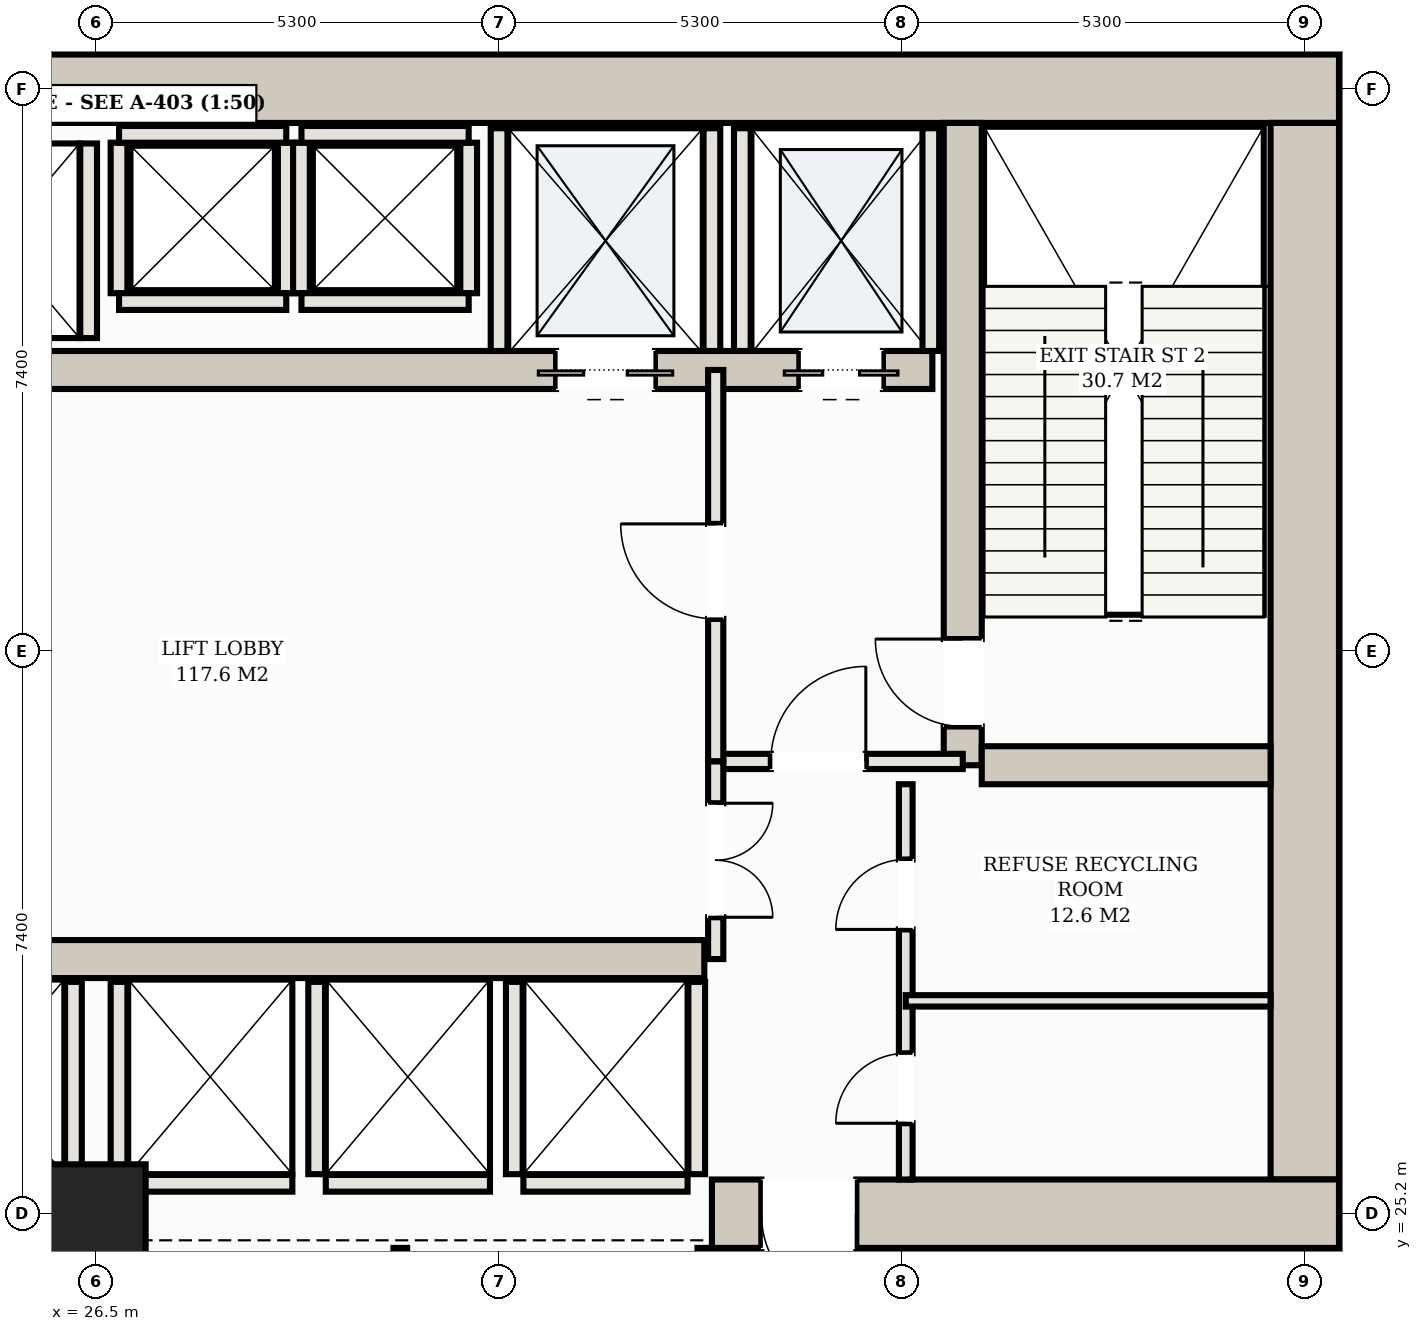
"""IFC4 building model, lengths in metres.
Left out: names, types, materials, properties, quantities, classifications, styles, units other than length and angle.
Written with IfcOpenShell. Run it as: python <this file> out.ifc"""

import sys

from ifc_helpers import new_model, si_unit, direction, frame, frame_2d, origin, origin_2d, place, context, subcontext, project, spatial, rectangle, hollow_rectangle, extrude, element, fill, save


model = new_model("IFC4")
c1 = context("Model", 3, precision=1e-05, world=origin(), true_north=direction((0.0, 1.0)))
c2 = subcontext(c1, "Body", "Model", "MODEL_VIEW")
j1 = project(units=[si_unit("LENGTHUNIT", "METRE"), si_unit("PLANEANGLEUNIT", "RADIAN")], contexts=[c1])
p1 = place(None, origin())
s1 = spatial("IfcSite", under=j1, at=p1, CompositionType="ELEMENT")
p2 = place(p1, origin())
s2 = spatial("IfcBuilding", under=s1, at=p2, CompositionType="ELEMENT")
p3 = place(p2, frame((0.0, 0.0, 19.0)))
s3 = spatial("IfcBuildingStorey", under=s2, at=p3, CompositionType="ELEMENT", Elevation=19.0)
p4 = place(p3, frame((10.15, 40.0, 0.0), z_axis=(0.0, 0.0, 1.0), x_axis=(1.0, 0.0, 0.0)))
e1 = element("IfcWall", 1, at=p4, inside=s3, PredefinedType="SHEAR", context=c2, shape_type="SweptSolid", body=[
    extrude(rectangle(XDim=32.7, YDim=0.9, at=frame_2d((16.35, 0.0))), origin(), (0.0, 0.0, 1.0), 4.86),
])
p5 = place(p3, frame((42.4, 25.65, 0.0), z_axis=(0.0, 0.0, 1.0), x_axis=(0.0, 1.0, 0.0)))
e2 = element("IfcWall", 2, at=p5, inside=s3, PredefinedType="SHEAR", context=c2, shape_type="SweptSolid", body=[
    extrude(rectangle(XDim=13.9, YDim=0.9, at=frame_2d((6.95, 0.0))), origin(), (0.0, 0.0, 1.0), 4.86),
])
p6 = place(p3, frame((34.6, 25.2, 0.0), z_axis=(0.0, 0.0, 1.0), x_axis=(1.0, 0.0, 0.0)))
e3 = element("IfcWall", 3, at=p6, inside=s3, PredefinedType="SHEAR", context=c2, shape_type="SweptSolid", body=[
    extrude(rectangle(XDim=8.25, YDim=0.9, at=frame_2d((4.125, 0.0))), origin(), (0.0, 0.0, 1.0), 4.86),
])
p7 = place(p6, frame((0.65, 0.0, 0.0)))
e4 = element("IfcOpeningElement", 4, at=p7, cuts=e3, PredefinedType="OPENING", context=c2, shape_type="SweptSolid", body=[
    extrude(rectangle(XDim=1.25, YDim=2.2, at=frame_2d((0.625, 1.1))), frame((0.0, 0.46, 0.0), z_axis=(0.0, -1.0, 0.0), x_axis=(1.0, 0.0, 0.0)), (0.0, 0.0, 1.0), 0.92),
])
p8 = place(p3, frame((37.9, 31.1, 0.0), z_axis=(0.0, 0.0, 1.0), x_axis=(0.0, 1.0, 0.0)))
e5 = element("IfcWall", 5, at=p8, inside=s3, PredefinedType="SHEAR", context=c2, shape_type="SweptSolid", body=[
    extrude(rectangle(XDim=8.45, YDim=0.5, at=frame_2d((4.225, 0.0))), origin(), (0.0, 0.0, 1.0), 4.86),
])
p9 = place(p8, frame((0.51, 0.0, 0.0)))
e6 = element("IfcOpeningElement", 6, at=p9, cuts=e5, PredefinedType="OPENING", context=c2, shape_type="SweptSolid", body=[
    extrude(rectangle(XDim=1.15, YDim=2.2, at=frame_2d((0.575, 1.1))), frame((0.0, 0.26, 0.0), z_axis=(0.0, -1.0, 0.0), x_axis=(1.0, 0.0, 0.0)), (0.0, 0.0, 1.0), 0.52),
])
p10 = place(p3, frame((38.15, 31.1, 0.0), z_axis=(0.0, 0.0, 1.0), x_axis=(1.0, 0.0, 0.0)))
e7 = element("IfcWall", 7, at=p10, inside=s3, PredefinedType="SHEAR", context=c2, shape_type="SweptSolid", body=[
    extrude(rectangle(XDim=3.8, YDim=0.5, at=frame_2d((1.9, 0.0))), origin(), (0.0, 0.0, 1.0), 4.86),
])
p11 = place(p3, frame((15.5, 36.3, 0.0), z_axis=(0.0, 0.0, 1.0), x_axis=(1.0, 0.0, 0.0)))
e8 = element("IfcWall", 8, at=p11, inside=s3, PredefinedType="SHEAR", context=c2, shape_type="SweptSolid", body=[
    extrude(rectangle(XDim=22.0, YDim=0.5, at=frame_2d((11.0, 0.0))), origin(), (0.0, 0.0, 1.0), 4.86),
])
p12 = place(p11, frame((0.65, 0.0, 0.0)))
e9 = element("IfcOpeningElement", 9, at=p12, cuts=e8, PredefinedType="OPENING", context=c2, shape_type="SweptSolid", body=[
    extrude(rectangle(XDim=1.1, YDim=2.15, at=frame_2d((0.55, 1.075))), frame((0.0, 0.26, 0.0), z_axis=(0.0, -1.0, 0.0), x_axis=(1.0, 0.0, 0.0)), (0.0, 0.0, 1.0), 0.52),
])
p13 = place(p11, frame((20.25, 0.0, 0.0)))
e10 = element("IfcOpeningElement", 10, at=p13, cuts=e8, PredefinedType="OPENING", context=c2, shape_type="SweptSolid", body=[
    extrude(rectangle(XDim=1.1, YDim=2.15, at=frame_2d((0.55, 1.075))), frame((0.0, 0.26, 0.0), z_axis=(0.0, -1.0, 0.0), x_axis=(1.0, 0.0, 0.0)), (0.0, 0.0, 1.0), 0.52),
])
p14 = place(p11, frame((17.05, 0.0, 0.0)))
e11 = element("IfcOpeningElement", 11, at=p14, cuts=e8, PredefinedType="OPENING", context=c2, shape_type="SweptSolid", body=[
    extrude(rectangle(XDim=1.3, YDim=2.2, at=frame_2d((0.65, 1.1))), frame((0.0, 0.26, 0.0), z_axis=(0.0, -1.0, 0.0), x_axis=(1.0, 0.0, 0.0)), (0.0, 0.0, 1.0), 0.52),
])
p15 = place(p3, frame((18.5, 28.55, 0.0), z_axis=(0.0, 0.0, 1.0), x_axis=(1.0, 0.0, 0.0)))
e12 = element("IfcWall", 12, at=p15, inside=s3, PredefinedType="SHEAR", context=c2, shape_type="SweptSolid", body=[
    extrude(rectangle(XDim=16.0, YDim=0.5, at=frame_2d((8.0, 0.0))), origin(), (0.0, 0.0, 1.0), 4.86),
])
p16 = place(p15, frame((0.75, 0.0, 0.0)))
e13 = element("IfcOpeningElement", 13, at=p16, cuts=e12, PredefinedType="OPENING", context=c2, shape_type="SweptSolid", body=[
    extrude(rectangle(XDim=1.1, YDim=2.15, at=frame_2d((0.55, 1.075))), frame((0.0, 0.26, 0.0), z_axis=(0.0, -1.0, 0.0), x_axis=(1.0, 0.0, 0.0)), (0.0, 0.0, 1.0), 0.52),
])
p17 = place(p15, frame((3.35, 0.0, 0.0)))
e14 = element("IfcOpeningElement", 14, at=p17, cuts=e12, PredefinedType="OPENING", context=c2, shape_type="SweptSolid", body=[
    extrude(rectangle(XDim=1.1, YDim=2.15, at=frame_2d((0.55, 1.075))), frame((0.0, 0.26, 0.0), z_axis=(0.0, -1.0, 0.0), x_axis=(1.0, 0.0, 0.0)), (0.0, 0.0, 1.0), 0.52),
])
p18 = place(p15, frame((5.95, 0.0, 0.0)))
e15 = element("IfcOpeningElement", 15, at=p18, cuts=e12, PredefinedType="OPENING", context=c2, shape_type="SweptSolid", body=[
    extrude(rectangle(XDim=1.1, YDim=2.15, at=frame_2d((0.55, 1.075))), frame((0.0, 0.26, 0.0), z_axis=(0.0, -1.0, 0.0), x_axis=(1.0, 0.0, 0.0)), (0.0, 0.0, 1.0), 0.52),
])
p19 = place(p3, frame((26.5, 25.2, 0.0), z_axis=(0.0, 0.0, 1.0), x_axis=(1.0, 0.0, 0.0)))
e16 = element("IfcColumn", 16, at=p19, inside=s3, PredefinedType="COLUMN", context=c2, shape_type="SweptSolid", body=[
    extrude(hollow_rectangle(XDim=1.3, YDim=1.3, WallThickness=0.042, at=origin_2d()), origin(), (0.0, 0.0, 1.0), 5.2),
])
for number, where, z_axis, x_axis in (
    (17, (35.0, 36.55, 0.0), (0.0, 0.0, 1.0), (0.0, 1.0, 0.0)),
    (18, (37.48, 36.55, 0.0), (0.0, 0.0, 1.0), (0.0, 1.0, 0.0)),
    (19, (31.8, 36.55, 0.0), (0.0, 0.0, 1.0), (0.0, 1.0, 0.0)),
    (20, (34.6, 36.55, 0.0), (0.0, 0.0, 1.0), (0.0, 1.0, 0.0)),
):
    element("IfcWall", number, at=place(p3, frame(where, z_axis=z_axis, x_axis=x_axis)), inside=s3, PredefinedType="SOLIDWALL", context=c2, shape_type="SweptSolid", body=[
        extrude(rectangle(XDim=2.93, YDim=0.22, at=frame_2d((1.465, 0.0))), origin(), (0.0, 0.0, 1.0), 4.86),
    ])
p20 = place(p3, frame((26.2, 25.72, 0.0), z_axis=(0.0, 0.0, 1.0), x_axis=(0.0, 1.0, 0.0)))
e21 = element("IfcWall", 21, at=p20, inside=s3, PredefinedType="SOLIDWALL", context=c2, shape_type="SweptSolid", body=[
    extrude(rectangle(XDim=2.53, YDim=0.22, at=frame_2d((1.265, 0.0))), origin(), (0.0, 0.0, 1.0), 4.86),
])
p21 = place(p3, frame((23.92, 25.6, 0.0), z_axis=(0.0, 0.0, 1.0), x_axis=(1.0, 0.0, 0.0)))
e22 = element("IfcWall", 22, at=p21, inside=s3, PredefinedType="SOLIDWALL", context=c2, shape_type="SweptSolid", body=[
    extrude(rectangle(XDim=2.16, YDim=0.22, at=frame_2d((1.08, 0.0))), origin(), (0.0, 0.0, 1.0), 4.86),
])
p22 = place(p3, frame((26.8, 25.72, 0.0), z_axis=(0.0, 0.0, 1.0), x_axis=(0.0, 1.0, 0.0)))
e23 = element("IfcWall", 23, at=p22, inside=s3, PredefinedType="SOLIDWALL", context=c2, shape_type="SweptSolid", body=[
    extrude(rectangle(XDim=2.53, YDim=0.22, at=frame_2d((1.265, 0.0))), origin(), (0.0, 0.0, 1.0), 4.86),
])
p23 = place(p3, frame((26.92, 25.6, 0.0), z_axis=(0.0, 0.0, 1.0), x_axis=(1.0, 0.0, 0.0)))
e24 = element("IfcWall", 24, at=p23, inside=s3, PredefinedType="SOLIDWALL", context=c2, shape_type="SweptSolid", body=[
    extrude(rectangle(XDim=2.16, YDim=0.22, at=frame_2d((1.08, 0.0))), origin(), (0.0, 0.0, 1.0), 4.86),
])
p24 = place(p3, frame((29.4, 25.72, 0.0), z_axis=(0.0, 0.0, 1.0), x_axis=(0.0, 1.0, 0.0)))
e25 = element("IfcWall", 25, at=p24, inside=s3, PredefinedType="SOLIDWALL", context=c2, shape_type="SweptSolid", body=[
    extrude(rectangle(XDim=2.53, YDim=0.22, at=frame_2d((1.265, 0.0))), origin(), (0.0, 0.0, 1.0), 4.86),
])
p25 = place(p3, frame((29.52, 25.6, 0.0), z_axis=(0.0, 0.0, 1.0), x_axis=(1.0, 0.0, 0.0)))
e26 = element("IfcWall", 26, at=p25, inside=s3, PredefinedType="SOLIDWALL", context=c2, shape_type="SweptSolid", body=[
    extrude(rectangle(XDim=2.16, YDim=0.22, at=frame_2d((1.08, 0.0))), origin(), (0.0, 0.0, 1.0), 4.86),
])
for number, where, z_axis, x_axis in (
    (27, (32.0, 25.72, 0.0), (0.0, 0.0, 1.0), (0.0, 1.0, 0.0)),
    (28, (34.4, 25.72, 0.0), (0.0, 0.0, 1.0), (0.0, 1.0, 0.0)),
):
    element("IfcWall", number, at=place(p3, frame(where, z_axis=z_axis, x_axis=x_axis)), inside=s3, PredefinedType="SOLIDWALL", context=c2, shape_type="SweptSolid", body=[
        extrude(rectangle(XDim=2.53, YDim=0.22, at=frame_2d((1.265, 0.0))), origin(), (0.0, 0.0, 1.0), 4.86),
    ])
p26 = place(p3, frame((32.12, 25.6, 0.0), z_axis=(0.0, 0.0, 1.0), x_axis=(1.0, 0.0, 0.0)))
e29 = element("IfcWall", 29, at=p26, inside=s3, PredefinedType="SOLIDWALL", context=c2, shape_type="SweptSolid", body=[
    extrude(rectangle(XDim=2.16, YDim=0.22, at=frame_2d((1.08, 0.0))), origin(), (0.0, 0.0, 1.0), 4.86),
])
p27 = place(p3, frame((26.4, 36.72, 0.0), z_axis=(0.0, 0.0, 1.0), x_axis=(0.0, 1.0, 0.0)))
e30 = element("IfcWall", 30, at=p27, inside=s3, PredefinedType="SOLIDWALL", context=c2, shape_type="SweptSolid", body=[
    extrude(rectangle(XDim=2.56, YDim=0.22, at=frame_2d((1.28, 0.0))), origin(), (0.0, 0.0, 1.0), 4.86),
])
for number, where, z_axis, x_axis in (
    (31, (26.8, 37.31, 0.0), (0.0, 0.0, 1.0), (0.0, 1.0, 0.0)),
    (32, (29.0, 37.31, 0.0), (0.0, 0.0, 1.0), (0.0, 1.0, 0.0)),
):
    element("IfcWall", number, at=place(p3, frame(where, z_axis=z_axis, x_axis=x_axis)), inside=s3, PredefinedType="SOLIDWALL", context=c2, shape_type="SweptSolid", body=[
        extrude(rectangle(XDim=1.98, YDim=0.22, at=frame_2d((0.99, 0.0))), origin(), (0.0, 0.0, 1.0), 4.86),
    ])
for number, where, z_axis, x_axis in (
    (33, (26.8, 39.4, 0.0), (0.0, 0.0, 1.0), (1.0, 0.0, 0.0)),
    (34, (26.8, 37.2, 0.0), (0.0, 0.0, 1.0), (1.0, 0.0, 0.0)),
):
    element("IfcWall", number, at=place(p3, frame(where, z_axis=z_axis, x_axis=x_axis)), inside=s3, PredefinedType="SOLIDWALL", context=c2, shape_type="SweptSolid", body=[
        extrude(rectangle(XDim=2.2, YDim=0.22, at=frame_2d((1.1, 0.0))), origin(), (0.0, 0.0, 1.0), 4.86),
    ])
for number, where, z_axis, x_axis in (
    (35, (29.2, 37.31, 0.0), (0.0, 0.0, 1.0), (0.0, 1.0, 0.0)),
    (36, (31.4, 37.31, 0.0), (0.0, 0.0, 1.0), (0.0, 1.0, 0.0)),
):
    element("IfcWall", number, at=place(p3, frame(where, z_axis=z_axis, x_axis=x_axis)), inside=s3, PredefinedType="SOLIDWALL", context=c2, shape_type="SweptSolid", body=[
        extrude(rectangle(XDim=1.98, YDim=0.22, at=frame_2d((0.99, 0.0))), origin(), (0.0, 0.0, 1.0), 4.86),
    ])
for number, where, z_axis, x_axis in (
    (37, (29.2, 39.4, 0.0), (0.0, 0.0, 1.0), (1.0, 0.0, 0.0)),
    (38, (29.2, 37.2, 0.0), (0.0, 0.0, 1.0), (1.0, 0.0, 0.0)),
):
    element("IfcWall", number, at=place(p3, frame(where, z_axis=z_axis, x_axis=x_axis)), inside=s3, PredefinedType="SOLIDWALL", context=c2, shape_type="SweptSolid", body=[
        extrude(rectangle(XDim=2.2, YDim=0.22, at=frame_2d((1.1, 0.0))), origin(), (0.0, 0.0, 1.0), 4.86),
    ])
p28 = place(p3, frame((34.65, 31.15, 0.0), z_axis=(0.0, 0.0, 1.0), x_axis=(1.0, 0.0, 0.0)))
e39 = element("IfcWall", 39, at=p28, inside=s3, PredefinedType="PARTITIONING", context=c2, shape_type="SweptSolid", body=[
    extrude(rectangle(XDim=3.25, YDim=0.2, at=frame_2d((1.625, 0.0))), origin(), (0.0, 0.0, 1.0), 4.86),
])
p29 = place(p28, frame((0.725, 0.0, 0.0)))
e40 = element("IfcOpeningElement", 40, at=p29, cuts=e39, PredefinedType="OPENING", context=c2, shape_type="SweptSolid", body=[
    extrude(rectangle(XDim=1.25, YDim=2.2, at=frame_2d((0.625, 1.1))), frame((0.0, 0.11, 0.0), z_axis=(0.0, -1.0, 0.0), x_axis=(1.0, 0.0, 0.0)), (0.0, 0.0, 1.0), 0.22),
])
p30 = place(p3, frame((34.65, 31.15, 0.0), z_axis=(0.0, 0.0, 1.0), x_axis=(0.0, 1.0, 0.0)))
e41 = element("IfcWall", 41, at=p30, inside=s3, PredefinedType="PARTITIONING", context=c2, shape_type="SweptSolid", body=[
    extrude(rectangle(XDim=5.15, YDim=0.2, at=frame_2d((2.575, 0.0))), origin(), (0.0, 0.0, 1.0), 4.86),
])
p31 = place(p30, frame((1.875, 0.0, 0.0)))
e42 = element("IfcOpeningElement", 42, at=p31, cuts=e41, PredefinedType="OPENING", context=c2, shape_type="SweptSolid", body=[
    extrude(rectangle(XDim=1.25, YDim=2.2, at=frame_2d((0.625, 1.1))), frame((0.0, 0.11, 0.0), z_axis=(0.0, -1.0, 0.0), x_axis=(1.0, 0.0, 0.0)), (0.0, 0.0, 1.0), 0.22),
])
p32 = place(p3, frame((37.15, 25.65, 0.0), z_axis=(0.0, 0.0, 1.0), x_axis=(0.0, 1.0, 0.0)))
e43 = element("IfcWall", 43, at=p32, inside=s3, PredefinedType="PARTITIONING", context=c2, shape_type="SweptSolid", body=[
    extrude(rectangle(XDim=5.2, YDim=0.18, at=frame_2d((2.6, 0.0))), origin(), (0.0, 0.0, 1.0), 3.055),
])
p33 = place(p32, frame((0.74, 0.0, 0.0)))
e44 = element("IfcOpeningElement", 44, at=p33, cuts=e43, PredefinedType="OPENING", context=c2, shape_type="SweptSolid", body=[
    extrude(rectangle(XDim=0.92, YDim=2.15, at=frame_2d((0.46, 1.075))), frame((0.0, 0.1, 0.0), z_axis=(0.0, -1.0, 0.0), x_axis=(1.0, 0.0, 0.0)), (0.0, 0.0, 1.0), 0.2),
])
p34 = place(p32, frame((3.29, 0.0, 0.0)))
e45 = element("IfcOpeningElement", 45, at=p34, cuts=e43, PredefinedType="OPENING", context=c2, shape_type="SweptSolid", body=[
    extrude(rectangle(XDim=0.92, YDim=2.15, at=frame_2d((0.46, 1.075))), frame((0.0, 0.1, 0.0), z_axis=(0.0, -1.0, 0.0), x_axis=(1.0, 0.0, 0.0)), (0.0, 0.0, 1.0), 0.2),
])
p35 = place(p3, frame((37.15, 28.0, 0.0), z_axis=(0.0, 0.0, 1.0), x_axis=(1.0, 0.0, 0.0)))
e46 = element("IfcWall", 46, at=p35, inside=s3, PredefinedType="PARTITIONING", context=c2, shape_type="SweptSolid", body=[
    extrude(rectangle(XDim=4.8, YDim=0.15, at=frame_2d((2.4, 0.0))), origin(), (0.0, 0.0, 1.0), 4.86),
])
p36 = place(p3, frame((34.65, 28.55, 0.0), z_axis=(0.0, 0.0, 1.0), x_axis=(0.0, 1.0, 0.0)))
e47 = element("IfcWall", 47, at=p36, inside=s3, PredefinedType="PARTITIONING", context=c2, shape_type="SweptSolid", body=[
    extrude(rectangle(XDim=2.6, YDim=0.2, at=frame_2d((1.3, 0.0))), origin(), (0.0, 0.0, 1.0), 4.86),
])
p37 = place(p36, frame((0.55, 0.0, 0.0)))
e48 = element("IfcOpeningElement", 48, at=p37, cuts=e47, PredefinedType="OPENING", context=c2, shape_type="SweptSolid", body=[
    extrude(rectangle(XDim=1.5, YDim=2.25, at=frame_2d((0.75, 1.125))), frame((0.0, 0.11, 0.0), z_axis=(0.0, -1.0, 0.0), x_axis=(1.0, 0.0, 0.0)), (0.0, 0.0, 1.0), 0.22),
])
for number, where, z_axis, x_axis in (
    (49, (26.5, 16.2, 0.0), (0.0, 0.0, 1.0), (0.0, 1.0, 0.0)),
    (50, (30.5, 16.2, 0.0), (0.0, 0.0, 1.0), (0.0, 1.0, 0.0)),
    (51, (34.5, 16.2, 0.0), (0.0, 0.0, 1.0), (0.0, 1.0, 0.0)),
):
    element("IfcWall", number, at=place(p3, frame(where, z_axis=z_axis, x_axis=x_axis)), inside=s3, PredefinedType="PARTITIONING", context=c2, shape_type="SweptSolid", body=[
        extrude(rectangle(XDim=8.55, YDim=0.18, at=frame_2d((4.275, 0.0))), origin(), (0.0, 0.0, 1.0), 4.86),
    ])
p38 = place(p13, frame((1.1, 0.0, 0.0), z_axis=(0.0, 0.0, 1.0), x_axis=(-1.0, 0.0, 0.0)))
e52 = element("IfcDoor", 52, at=p38, inside=s3, OperationType="DOUBLE_DOOR_SLIDING", PredefinedType="DOOR", context=c2, shape_type="SweptSolid", body=[
    extrude(rectangle(XDim=1.1, YDim=2.15, at=frame_2d((0.55, 1.075))), frame((0.0, 0.025, 0.0), z_axis=(0.0, -1.0, 0.0), x_axis=(1.0, 0.0, 0.0)), (0.0, 0.0, 1.0), 0.05),
])
fill(e10, e52)
p39 = place(p14, frame((1.3, 0.0, 0.0), z_axis=(0.0, 0.0, 1.0), x_axis=(-1.0, 0.0, 0.0)))
e53 = element("IfcDoor", 53, at=p39, inside=s3, OperationType="DOUBLE_DOOR_SLIDING", PredefinedType="DOOR", context=c2, shape_type="SweptSolid", body=[
    extrude(rectangle(XDim=1.3, YDim=2.2, at=frame_2d((0.65, 1.1))), frame((0.0, 0.025, 0.0), z_axis=(0.0, -1.0, 0.0), x_axis=(1.0, 0.0, 0.0)), (0.0, 0.0, 1.0), 0.05),
])
fill(e11, e53)
p40 = place(p7, frame((1.25, 0.0, 0.0), z_axis=(0.0, 0.0, 1.0), x_axis=(-1.0, 0.0, 0.0)))
e54 = element("IfcDoor", 54, at=p40, inside=s3, OperationType="SINGLE_SWING_LEFT", PredefinedType="DOOR", context=c2, shape_type="SweptSolid", body=[
    extrude(rectangle(XDim=1.25, YDim=2.2, at=frame_2d((0.625, 1.1))), frame((0.0, 0.025, 0.0), z_axis=(0.0, -1.0, 0.0), x_axis=(1.0, 0.0, 0.0)), (0.0, 0.0, 1.0), 0.05),
])
fill(e4, e54)
p41 = place(p29, origin())
e55 = element("IfcDoor", 55, at=p41, inside=s3, OperationType="SINGLE_SWING_RIGHT", PredefinedType="DOOR", context=c2, shape_type="SweptSolid", body=[
    extrude(rectangle(XDim=1.25, YDim=2.2, at=frame_2d((0.625, 1.1))), frame((0.0, 0.025, 0.0), z_axis=(0.0, -1.0, 0.0), x_axis=(1.0, 0.0, 0.0)), (0.0, 0.0, 1.0), 0.05),
])
fill(e40, e55)
p42 = place(p31, origin())
e56 = element("IfcDoor", 56, at=p42, inside=s3, OperationType="SINGLE_SWING_RIGHT", PredefinedType="DOOR", context=c2, shape_type="SweptSolid", body=[
    extrude(rectangle(XDim=1.25, YDim=2.2, at=frame_2d((0.625, 1.1))), frame((0.0, 0.025, 0.0), z_axis=(0.0, -1.0, 0.0), x_axis=(1.0, 0.0, 0.0)), (0.0, 0.0, 1.0), 0.05),
])
fill(e42, e56)
p43 = place(p9, origin())
e57 = element("IfcDoor", 57, at=p43, inside=s3, OperationType="SINGLE_SWING_RIGHT", PredefinedType="DOOR", context=c2, shape_type="SweptSolid", body=[
    extrude(rectangle(XDim=1.15, YDim=2.2, at=frame_2d((0.575, 1.1))), frame((0.0, 0.025, 0.0), z_axis=(0.0, -1.0, 0.0), x_axis=(1.0, 0.0, 0.0)), (0.0, 0.0, 1.0), 0.05),
])
fill(e6, e57)
p44 = place(p33, origin())
e58 = element("IfcDoor", 58, at=p44, inside=s3, OperationType="SINGLE_SWING_LEFT", PredefinedType="DOOR", context=c2, shape_type="SweptSolid", body=[
    extrude(rectangle(XDim=0.92, YDim=2.15, at=frame_2d((0.46, 1.075))), frame((0.0, 0.025, 0.0), z_axis=(0.0, -1.0, 0.0), x_axis=(1.0, 0.0, 0.0)), (0.0, 0.0, 1.0), 0.05),
])
fill(e44, e58)
p45 = place(p34, origin())
e59 = element("IfcDoor", 59, at=p45, inside=s3, OperationType="SINGLE_SWING_LEFT", PredefinedType="DOOR", context=c2, shape_type="SweptSolid", body=[
    extrude(rectangle(XDim=0.92, YDim=2.15, at=frame_2d((0.46, 1.075))), frame((0.0, 0.025, 0.0), z_axis=(0.0, -1.0, 0.0), x_axis=(1.0, 0.0, 0.0)), (0.0, 0.0, 1.0), 0.05),
])
fill(e45, e59)
p46 = place(p37, frame((1.5, 0.0, 0.0), z_axis=(0.0, 0.0, 1.0), x_axis=(-1.0, 0.0, 0.0)))
e60 = element("IfcDoor", 60, at=p46, inside=s3, OperationType="DOUBLE_DOOR_SINGLE_SWING", PredefinedType="DOOR", context=c2, shape_type="SweptSolid", body=[
    extrude(rectangle(XDim=1.5, YDim=2.25, at=frame_2d((0.75, 1.125))), frame((0.0, 0.025, 0.0), z_axis=(0.0, -1.0, 0.0), x_axis=(1.0, 0.0, 0.0)), (0.0, 0.0, 1.0), 0.05),
])
fill(e48, e60)
save(model, sys.argv[1])
